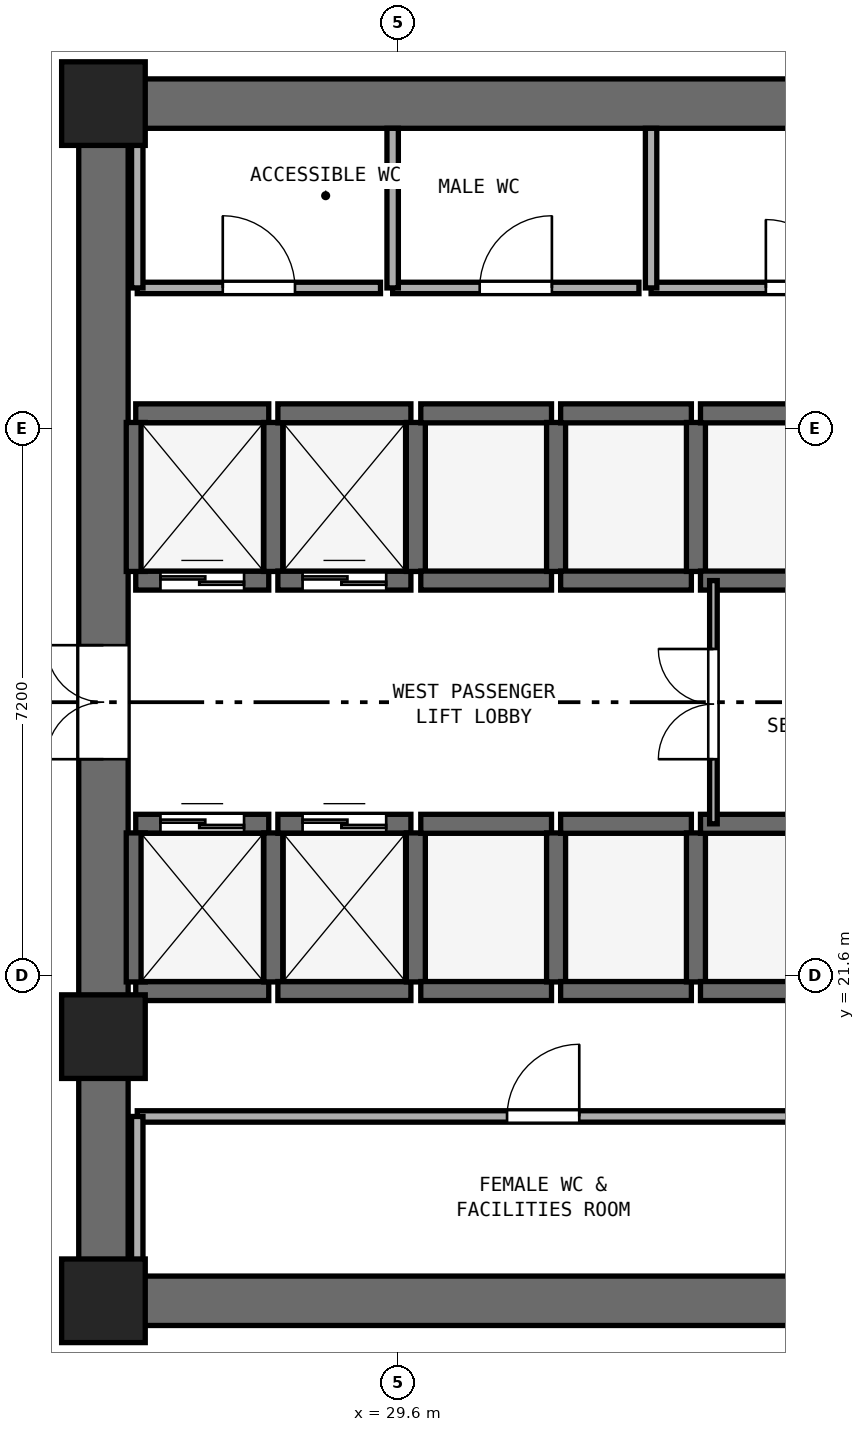
"""IFC4 building model, lengths in metres.
Left out: names, types, materials, properties, quantities, classifications, styles, units other than length and angle.
Written with IfcOpenShell. Run it as: python <this file> out.ifc"""

import sys

from ifc_helpers import new_model, si_unit, direction, frame, frame_2d, origin, origin_2d, place, context, subcontext, project, spatial, rectangle, extrude, element, fill, save


model = new_model("IFC4")
c1 = context("Model", 3, precision=1e-05, world=origin(), true_north=direction((0.0, 1.0)))
c2 = subcontext(c1, "Body", "Model", "MODEL_VIEW")
j1 = project(units=[si_unit("LENGTHUNIT", "METRE"), si_unit("PLANEANGLEUNIT", "RADIAN")], contexts=[c1])
p1 = place(None, origin())
s1 = spatial("IfcSite", under=j1, at=p1, CompositionType="ELEMENT")
p2 = place(p1, origin())
s2 = spatial("IfcBuilding", under=s1, at=p2, CompositionType="ELEMENT")
p3 = place(p2, frame((0.0, 0.0, 10.0)))
s3 = spatial("IfcBuildingStorey", under=s2, at=p3, CompositionType="ELEMENT", Elevation=10.0)
for number, where, z_axis, x_axis in (
    (1, (25.4, 17.325, 0.0), (0.0, 0.0, 1.0), (1.0, 0.0, 0.0)),
    (2, (25.4, 33.075, 0.0), (0.0, 0.0, 1.0), (1.0, 0.0, 0.0)),
):
    element("IfcWall", number, at=place(p3, frame(where, z_axis=z_axis, x_axis=x_axis)), inside=s3, PredefinedType="SHEAR", context=c2, shape_type="SweptSolid", body=[
        extrude(rectangle(XDim=23.2, YDim=0.65, at=frame_2d((11.6, 0.0))), origin(), (0.0, 0.0, 1.0), 4.68),
    ])
p4 = place(p3, frame((25.725, 17.65, 0.0), z_axis=(0.0, 0.0, 1.0), x_axis=(0.0, 1.0, 0.0)))
e3 = element("IfcWall", 3, at=p4, inside=s3, PredefinedType="SHEAR", context=c2, shape_type="SweptSolid", body=[
    extrude(rectangle(XDim=15.1, YDim=0.65, at=frame_2d((7.55, 0.0))), origin(), (0.0, 0.0, 1.0), 4.68),
])
p5 = place(p4, frame((6.8, 0.0, 0.0)))
e4 = element("IfcOpeningElement", 4, at=p5, cuts=e3, PredefinedType="OPENING", context=c2, shape_type="SweptSolid", body=[
    extrude(rectangle(XDim=1.5, YDim=2.15, at=frame_2d((0.75, 1.075))), frame((0.0, 0.335, 0.0), z_axis=(0.0, -1.0, 0.0), x_axis=(1.0, 0.0, 0.0)), (0.0, 0.0, 1.0), 0.67),
])
for number, where, z_axis, x_axis in (
    (5, (25.725, 17.325, 0.0), (0.0, 0.0, 1.0), (1.0, 0.0, 0.0)),
    (6, (25.725, 33.075, 0.0), (0.0, 0.0, 1.0), (1.0, 0.0, 0.0)),
    (7, (25.725, 20.8, 0.0), (0.0, 0.0, 1.0), (1.0, 0.0, 0.0)),
):
    element("IfcColumn", number, at=place(p3, frame(where, z_axis=z_axis, x_axis=x_axis)), inside=s3, PredefinedType="PILASTER", context=c2, shape_type="SweptSolid", body=[
        extrude(rectangle(XDim=1.1, YDim=1.1, at=origin_2d()), origin(), (0.0, 0.0, 1.0), 5.0),
    ])
p6 = place(p3, frame((26.15, 26.8, 0.0), z_axis=(0.0, 0.0, 1.0), x_axis=(1.0, 0.0, 0.0)))
e8 = element("IfcWall", 8, at=p6, inside=s3, PredefinedType="SHEAR", context=c2, shape_type="SweptSolid", body=[
    extrude(rectangle(XDim=1.75, YDim=0.25, at=frame_2d((0.875, 0.0))), origin(), (0.0, 0.0, 1.0), 4.68),
])
p7 = place(p6, frame((0.325, 0.0, 0.0)))
e9 = element("IfcOpeningElement", 9, at=p7, cuts=e8, PredefinedType="OPENING", context=c2, shape_type="SweptSolid", body=[
    extrude(rectangle(XDim=1.1, YDim=2.15, at=frame_2d((0.55, 1.075))), frame((0.0, 0.135, 0.0), z_axis=(0.0, -1.0, 0.0), x_axis=(1.0, 0.0, 0.0)), (0.0, 0.0, 1.0), 0.27),
])
p8 = place(p3, frame((26.15, 29.0, 0.0), z_axis=(0.0, 0.0, 1.0), x_axis=(1.0, 0.0, 0.0)))
e10 = element("IfcWall", 10, at=p8, inside=s3, PredefinedType="SHEAR", context=c2, shape_type="SweptSolid", body=[
    extrude(rectangle(XDim=1.75, YDim=0.25, at=frame_2d((0.875, 0.0))), origin(), (0.0, 0.0, 1.0), 4.68),
])
for number, where, z_axis, x_axis in (
    (11, (26.15, 26.92, 0.0), (0.0, 0.0, 1.0), (0.0, 1.0, 0.0)),
    (12, (27.96, 26.92, 0.0), (0.0, 0.0, 1.0), (0.0, 1.0, 0.0)),
):
    element("IfcWall", number, at=place(p3, frame(where, z_axis=z_axis, x_axis=x_axis)), inside=s3, PredefinedType="SHEAR", context=c2, shape_type="SweptSolid", body=[
        extrude(rectangle(XDim=1.96, YDim=0.25, at=frame_2d((0.98, 0.0))), origin(), (0.0, 0.0, 1.0), 4.68),
    ])
p9 = place(p3, frame((28.02, 26.8, 0.0), z_axis=(0.0, 0.0, 1.0), x_axis=(1.0, 0.0, 0.0)))
e13 = element("IfcWall", 13, at=p9, inside=s3, PredefinedType="SHEAR", context=c2, shape_type="SweptSolid", body=[
    extrude(rectangle(XDim=1.75, YDim=0.25, at=frame_2d((0.875, 0.0))), origin(), (0.0, 0.0, 1.0), 4.68),
])
p10 = place(p9, frame((0.325, 0.0, 0.0)))
e14 = element("IfcOpeningElement", 14, at=p10, cuts=e13, PredefinedType="OPENING", context=c2, shape_type="SweptSolid", body=[
    extrude(rectangle(XDim=1.1, YDim=2.15, at=frame_2d((0.55, 1.075))), frame((0.0, 0.135, 0.0), z_axis=(0.0, -1.0, 0.0), x_axis=(1.0, 0.0, 0.0)), (0.0, 0.0, 1.0), 0.27),
])
p11 = place(p3, frame((28.02, 29.0, 0.0), z_axis=(0.0, 0.0, 1.0), x_axis=(1.0, 0.0, 0.0)))
e15 = element("IfcWall", 15, at=p11, inside=s3, PredefinedType="SHEAR", context=c2, shape_type="SweptSolid", body=[
    extrude(rectangle(XDim=1.75, YDim=0.25, at=frame_2d((0.875, 0.0))), origin(), (0.0, 0.0, 1.0), 4.68),
])
p12 = place(p3, frame((29.835, 26.92, 0.0), z_axis=(0.0, 0.0, 1.0), x_axis=(0.0, 1.0, 0.0)))
e16 = element("IfcWall", 16, at=p12, inside=s3, PredefinedType="SHEAR", context=c2, shape_type="SweptSolid", body=[
    extrude(rectangle(XDim=1.96, YDim=0.25, at=frame_2d((0.98, 0.0))), origin(), (0.0, 0.0, 1.0), 4.68),
])
p13 = place(p3, frame((26.15, 21.4, 0.0), z_axis=(0.0, 0.0, 1.0), x_axis=(1.0, 0.0, 0.0)))
e17 = element("IfcWall", 17, at=p13, inside=s3, PredefinedType="SHEAR", context=c2, shape_type="SweptSolid", body=[
    extrude(rectangle(XDim=1.75, YDim=0.25, at=frame_2d((0.875, 0.0))), origin(), (0.0, 0.0, 1.0), 4.68),
])
p14 = place(p3, frame((26.15, 23.6, 0.0), z_axis=(0.0, 0.0, 1.0), x_axis=(1.0, 0.0, 0.0)))
e18 = element("IfcWall", 18, at=p14, inside=s3, PredefinedType="SHEAR", context=c2, shape_type="SweptSolid", body=[
    extrude(rectangle(XDim=1.75, YDim=0.25, at=frame_2d((0.875, 0.0))), origin(), (0.0, 0.0, 1.0), 4.68),
])
p15 = place(p14, frame((0.325, 0.0, 0.0)))
e19 = element("IfcOpeningElement", 19, at=p15, cuts=e18, PredefinedType="OPENING", context=c2, shape_type="SweptSolid", body=[
    extrude(rectangle(XDim=1.1, YDim=2.15, at=frame_2d((0.55, 1.075))), frame((0.0, 0.135, 0.0), z_axis=(0.0, -1.0, 0.0), x_axis=(1.0, 0.0, 0.0)), (0.0, 0.0, 1.0), 0.27),
])
for number, where, z_axis, x_axis in (
    (20, (26.15, 21.52, 0.0), (0.0, 0.0, 1.0), (0.0, 1.0, 0.0)),
    (21, (27.96, 21.52, 0.0), (0.0, 0.0, 1.0), (0.0, 1.0, 0.0)),
):
    element("IfcWall", number, at=place(p3, frame(where, z_axis=z_axis, x_axis=x_axis)), inside=s3, PredefinedType="SHEAR", context=c2, shape_type="SweptSolid", body=[
        extrude(rectangle(XDim=1.96, YDim=0.25, at=frame_2d((0.98, 0.0))), origin(), (0.0, 0.0, 1.0), 4.68),
    ])
p16 = place(p3, frame((28.02, 21.4, 0.0), z_axis=(0.0, 0.0, 1.0), x_axis=(1.0, 0.0, 0.0)))
e22 = element("IfcWall", 22, at=p16, inside=s3, PredefinedType="SHEAR", context=c2, shape_type="SweptSolid", body=[
    extrude(rectangle(XDim=1.75, YDim=0.25, at=frame_2d((0.875, 0.0))), origin(), (0.0, 0.0, 1.0), 4.68),
])
p17 = place(p3, frame((28.02, 23.6, 0.0), z_axis=(0.0, 0.0, 1.0), x_axis=(1.0, 0.0, 0.0)))
e23 = element("IfcWall", 23, at=p17, inside=s3, PredefinedType="SHEAR", context=c2, shape_type="SweptSolid", body=[
    extrude(rectangle(XDim=1.75, YDim=0.25, at=frame_2d((0.875, 0.0))), origin(), (0.0, 0.0, 1.0), 4.68),
])
p18 = place(p17, frame((0.325, 0.0, 0.0)))
e24 = element("IfcOpeningElement", 24, at=p18, cuts=e23, PredefinedType="OPENING", context=c2, shape_type="SweptSolid", body=[
    extrude(rectangle(XDim=1.1, YDim=2.15, at=frame_2d((0.55, 1.075))), frame((0.0, 0.135, 0.0), z_axis=(0.0, -1.0, 0.0), x_axis=(1.0, 0.0, 0.0)), (0.0, 0.0, 1.0), 0.27),
])
p19 = place(p3, frame((29.835, 21.52, 0.0), z_axis=(0.0, 0.0, 1.0), x_axis=(0.0, 1.0, 0.0)))
e25 = element("IfcWall", 25, at=p19, inside=s3, PredefinedType="SHEAR", context=c2, shape_type="SweptSolid", body=[
    extrude(rectangle(XDim=1.96, YDim=0.25, at=frame_2d((0.98, 0.0))), origin(), (0.0, 0.0, 1.0), 4.68),
])
for number, where, z_axis, x_axis in (
    (26, (29.9, 21.4, 0.0), (0.0, 0.0, 1.0), (1.0, 0.0, 0.0)),
    (27, (29.9, 23.6, 0.0), (0.0, 0.0, 1.0), (1.0, 0.0, 0.0)),
):
    element("IfcWall", number, at=place(p3, frame(where, z_axis=z_axis, x_axis=x_axis)), inside=s3, PredefinedType="SHEAR", context=c2, shape_type="SweptSolid", body=[
        extrude(rectangle(XDim=1.72, YDim=0.25, at=frame_2d((0.86, 0.0))), origin(), (0.0, 0.0, 1.0), 4.68),
    ])
p20 = place(p3, frame((31.68, 21.52, 0.0), z_axis=(0.0, 0.0, 1.0), x_axis=(0.0, 1.0, 0.0)))
e28 = element("IfcWall", 28, at=p20, inside=s3, PredefinedType="SHEAR", context=c2, shape_type="SweptSolid", body=[
    extrude(rectangle(XDim=1.96, YDim=0.25, at=frame_2d((0.98, 0.0))), origin(), (0.0, 0.0, 1.0), 4.68),
])
for number, where, z_axis, x_axis in (
    (29, (31.74, 21.4, 0.0), (0.0, 0.0, 1.0), (1.0, 0.0, 0.0)),
    (30, (31.74, 23.6, 0.0), (0.0, 0.0, 1.0), (1.0, 0.0, 0.0)),
):
    element("IfcWall", number, at=place(p3, frame(where, z_axis=z_axis, x_axis=x_axis)), inside=s3, PredefinedType="SHEAR", context=c2, shape_type="SweptSolid", body=[
        extrude(rectangle(XDim=1.72, YDim=0.25, at=frame_2d((0.86, 0.0))), origin(), (0.0, 0.0, 1.0), 4.68),
    ])
p21 = place(p3, frame((33.52, 21.52, 0.0), z_axis=(0.0, 0.0, 1.0), x_axis=(0.0, 1.0, 0.0)))
e31 = element("IfcWall", 31, at=p21, inside=s3, PredefinedType="SHEAR", context=c2, shape_type="SweptSolid", body=[
    extrude(rectangle(XDim=1.96, YDim=0.25, at=frame_2d((0.98, 0.0))), origin(), (0.0, 0.0, 1.0), 4.68),
])
for number, where, z_axis, x_axis in (
    (32, (33.58, 21.4, 0.0), (0.0, 0.0, 1.0), (1.0, 0.0, 0.0)),
    (33, (33.58, 23.6, 0.0), (0.0, 0.0, 1.0), (1.0, 0.0, 0.0)),
):
    element("IfcWall", number, at=place(p3, frame(where, z_axis=z_axis, x_axis=x_axis)), inside=s3, PredefinedType="SHEAR", context=c2, shape_type="SweptSolid", body=[
        extrude(rectangle(XDim=1.72, YDim=0.25, at=frame_2d((0.86, 0.0))), origin(), (0.0, 0.0, 1.0), 4.68),
    ])
for number, where, z_axis, x_axis in (
    (34, (29.9, 26.8, 0.0), (0.0, 0.0, 1.0), (1.0, 0.0, 0.0)),
    (35, (29.9, 29.0, 0.0), (0.0, 0.0, 1.0), (1.0, 0.0, 0.0)),
):
    element("IfcWall", number, at=place(p3, frame(where, z_axis=z_axis, x_axis=x_axis)), inside=s3, PredefinedType="SHEAR", context=c2, shape_type="SweptSolid", body=[
        extrude(rectangle(XDim=1.72, YDim=0.25, at=frame_2d((0.86, 0.0))), origin(), (0.0, 0.0, 1.0), 4.68),
    ])
p22 = place(p3, frame((31.68, 26.92, 0.0), z_axis=(0.0, 0.0, 1.0), x_axis=(0.0, 1.0, 0.0)))
e36 = element("IfcWall", 36, at=p22, inside=s3, PredefinedType="SHEAR", context=c2, shape_type="SweptSolid", body=[
    extrude(rectangle(XDim=1.96, YDim=0.25, at=frame_2d((0.98, 0.0))), origin(), (0.0, 0.0, 1.0), 4.68),
])
for number, where, z_axis, x_axis in (
    (37, (31.74, 26.8, 0.0), (0.0, 0.0, 1.0), (1.0, 0.0, 0.0)),
    (38, (31.74, 29.0, 0.0), (0.0, 0.0, 1.0), (1.0, 0.0, 0.0)),
):
    element("IfcWall", number, at=place(p3, frame(where, z_axis=z_axis, x_axis=x_axis)), inside=s3, PredefinedType="SHEAR", context=c2, shape_type="SweptSolid", body=[
        extrude(rectangle(XDim=1.72, YDim=0.25, at=frame_2d((0.86, 0.0))), origin(), (0.0, 0.0, 1.0), 4.68),
    ])
p23 = place(p3, frame((33.52, 26.92, 0.0), z_axis=(0.0, 0.0, 1.0), x_axis=(0.0, 1.0, 0.0)))
e39 = element("IfcWall", 39, at=p23, inside=s3, PredefinedType="SHEAR", context=c2, shape_type="SweptSolid", body=[
    extrude(rectangle(XDim=1.96, YDim=0.25, at=frame_2d((0.98, 0.0))), origin(), (0.0, 0.0, 1.0), 4.68),
])
for number, where, z_axis, x_axis in (
    (40, (33.58, 26.8, 0.0), (0.0, 0.0, 1.0), (1.0, 0.0, 0.0)),
    (41, (33.58, 29.0, 0.0), (0.0, 0.0, 1.0), (1.0, 0.0, 0.0)),
):
    element("IfcWall", number, at=place(p3, frame(where, z_axis=z_axis, x_axis=x_axis)), inside=s3, PredefinedType="SHEAR", context=c2, shape_type="SweptSolid", body=[
        extrude(rectangle(XDim=1.72, YDim=0.25, at=frame_2d((0.86, 0.0))), origin(), (0.0, 0.0, 1.0), 4.68),
    ])
p24 = place(p3, frame((26.17, 30.65, 0.0), z_axis=(0.0, 0.0, 1.0), x_axis=(1.0, 0.0, 0.0)))
e42 = element("IfcWall", 42, at=p24, inside=s3, PredefinedType="PARTITIONING", context=c2, shape_type="SweptSolid", body=[
    extrude(rectangle(XDim=3.2, YDim=0.15, at=frame_2d((1.6, 0.0))), origin(), (0.0, 0.0, 1.0), 4.68),
])
p25 = place(p24, frame((1.125, 0.0, 0.0)))
e43 = element("IfcOpeningElement", 43, at=p25, cuts=e42, PredefinedType="OPENING", context=c2, shape_type="SweptSolid", body=[
    extrude(rectangle(XDim=0.95, YDim=2.1, at=frame_2d((0.475, 1.05))), frame((0.0, 0.085, 0.0), z_axis=(0.0, -1.0, 0.0), x_axis=(1.0, 0.0, 0.0)), (0.0, 0.0, 1.0), 0.17),
])
p26 = place(p3, frame((26.17, 30.65, 0.0), z_axis=(0.0, 0.0, 1.0), x_axis=(0.0, 1.0, 0.0)))
e44 = element("IfcWall", 44, at=p26, inside=s3, PredefinedType="PARTITIONING", context=c2, shape_type="SweptSolid", body=[
    extrude(rectangle(XDim=2.1, YDim=0.15, at=frame_2d((1.05, 0.0))), origin(), (0.0, 0.0, 1.0), 4.68),
])
p27 = place(p3, frame((29.53, 30.65, 0.0), z_axis=(0.0, 0.0, 1.0), x_axis=(1.0, 0.0, 0.0)))
e45 = element("IfcWall", 45, at=p27, inside=s3, PredefinedType="PARTITIONING", context=c2, shape_type="SweptSolid", body=[
    extrude(rectangle(XDim=3.24, YDim=0.15, at=frame_2d((1.62, 0.0))), origin(), (0.0, 0.0, 1.0), 4.68),
])
p28 = place(p27, frame((1.145, 0.0, 0.0)))
e46 = element("IfcOpeningElement", 46, at=p28, cuts=e45, PredefinedType="OPENING", context=c2, shape_type="SweptSolid", body=[
    extrude(rectangle(XDim=0.95, YDim=2.1, at=frame_2d((0.475, 1.05))), frame((0.0, 0.085, 0.0), z_axis=(0.0, -1.0, 0.0), x_axis=(1.0, 0.0, 0.0)), (0.0, 0.0, 1.0), 0.17),
])
p29 = place(p3, frame((29.53, 30.65, 0.0), z_axis=(0.0, 0.0, 1.0), x_axis=(0.0, 1.0, 0.0)))
e47 = element("IfcWall", 47, at=p29, inside=s3, PredefinedType="PARTITIONING", context=c2, shape_type="SweptSolid", body=[
    extrude(rectangle(XDim=2.1, YDim=0.15, at=frame_2d((1.05, 0.0))), origin(), (0.0, 0.0, 1.0), 4.68),
])
p30 = place(p3, frame((32.93, 30.65, 0.0), z_axis=(0.0, 0.0, 1.0), x_axis=(1.0, 0.0, 0.0)))
e48 = element("IfcWall", 48, at=p30, inside=s3, PredefinedType="PARTITIONING", context=c2, shape_type="SweptSolid", body=[
    extrude(rectangle(XDim=3.92, YDim=0.15, at=frame_2d((1.96, 0.0))), origin(), (0.0, 0.0, 1.0), 4.68),
])
p31 = place(p30, frame((1.51, 0.0, 0.0)))
e49 = element("IfcOpeningElement", 49, at=p31, cuts=e48, PredefinedType="OPENING", context=c2, shape_type="SweptSolid", body=[
    extrude(rectangle(XDim=0.9, YDim=2.1, at=frame_2d((0.45, 1.05))), frame((0.0, 0.085, 0.0), z_axis=(0.0, -1.0, 0.0), x_axis=(1.0, 0.0, 0.0)), (0.0, 0.0, 1.0), 0.17),
])
p32 = place(p3, frame((32.93, 30.65, 0.0), z_axis=(0.0, 0.0, 1.0), x_axis=(0.0, 1.0, 0.0)))
e50 = element("IfcWall", 50, at=p32, inside=s3, PredefinedType="PARTITIONING", context=c2, shape_type="SweptSolid", body=[
    extrude(rectangle(XDim=2.1, YDim=0.15, at=frame_2d((1.05, 0.0))), origin(), (0.0, 0.0, 1.0), 4.68),
])
p33 = place(p3, frame((26.17, 19.75, 0.0), z_axis=(0.0, 0.0, 1.0), x_axis=(1.0, 0.0, 0.0)))
e51 = element("IfcWall", 51, at=p33, inside=s3, PredefinedType="PARTITIONING", context=c2, shape_type="SweptSolid", body=[
    extrude(rectangle(XDim=10.68, YDim=0.15, at=frame_2d((5.34, 0.0))), origin(), (0.0, 0.0, 1.0), 4.68),
])
p34 = place(p33, frame((4.865, 0.0, 0.0)))
e52 = element("IfcOpeningElement", 52, at=p34, cuts=e51, PredefinedType="OPENING", context=c2, shape_type="SweptSolid", body=[
    extrude(rectangle(XDim=0.95, YDim=2.1, at=frame_2d((0.475, 1.05))), frame((0.0, 0.085, 0.0), z_axis=(0.0, -1.0, 0.0), x_axis=(1.0, 0.0, 0.0)), (0.0, 0.0, 1.0), 0.17),
])
p35 = place(p3, frame((26.17, 17.65, 0.0), z_axis=(0.0, 0.0, 1.0), x_axis=(0.0, 1.0, 0.0)))
e53 = element("IfcWall", 53, at=p35, inside=s3, PredefinedType="PARTITIONING", context=c2, shape_type="SweptSolid", body=[
    extrude(rectangle(XDim=2.1, YDim=0.15, at=frame_2d((1.05, 0.0))), origin(), (0.0, 0.0, 1.0), 4.68),
])
p36 = place(p3, frame((33.75, 23.6, 0.0), z_axis=(0.0, 0.0, 1.0), x_axis=(0.0, 1.0, 0.0)))
e54 = element("IfcWall", 54, at=p36, inside=s3, PredefinedType="PARTITIONING", context=c2, shape_type="SweptSolid", body=[
    extrude(rectangle(XDim=3.2, YDim=0.1, at=frame_2d((1.6, 0.0))), origin(), (0.0, 0.0, 1.0), 4.68),
])
p37 = place(p36, frame((0.85, 0.0, 0.0)))
e55 = element("IfcOpeningElement", 55, at=p37, cuts=e54, PredefinedType="OPENING", context=c2, shape_type="SweptSolid", body=[
    extrude(rectangle(XDim=1.45, YDim=2.12, at=frame_2d((0.725, 1.06))), frame((0.0, 0.06, 0.0), z_axis=(0.0, -1.0, 0.0), x_axis=(1.0, 0.0, 0.0)), (0.0, 0.0, 1.0), 0.12),
])
p38 = place(p7, origin())
e56 = element("IfcDoor", 56, at=p38, inside=s3, OperationType="DOUBLE_DOOR_SLIDING", PredefinedType="DOOR", context=c2, shape_type="SweptSolid", body=[
    extrude(rectangle(XDim=1.1, YDim=2.15, at=frame_2d((0.55, 1.075))), frame((0.0, 0.025, 0.0), z_axis=(0.0, -1.0, 0.0), x_axis=(1.0, 0.0, 0.0)), (0.0, 0.0, 1.0), 0.05),
])
fill(e9, e56)
p39 = place(p10, origin())
e57 = element("IfcDoor", 57, at=p39, inside=s3, OperationType="DOUBLE_DOOR_SLIDING", PredefinedType="DOOR", context=c2, shape_type="SweptSolid", body=[
    extrude(rectangle(XDim=1.1, YDim=2.15, at=frame_2d((0.55, 1.075))), frame((0.0, 0.025, 0.0), z_axis=(0.0, -1.0, 0.0), x_axis=(1.0, 0.0, 0.0)), (0.0, 0.0, 1.0), 0.05),
])
fill(e14, e57)
p40 = place(p15, origin())
e58 = element("IfcDoor", 58, at=p40, inside=s3, OperationType="DOUBLE_DOOR_SLIDING", PredefinedType="DOOR", context=c2, shape_type="SweptSolid", body=[
    extrude(rectangle(XDim=1.1, YDim=2.15, at=frame_2d((0.55, 1.075))), frame((0.0, 0.025, 0.0), z_axis=(0.0, -1.0, 0.0), x_axis=(1.0, 0.0, 0.0)), (0.0, 0.0, 1.0), 0.05),
])
fill(e19, e58)
p41 = place(p18, origin())
e59 = element("IfcDoor", 59, at=p41, inside=s3, OperationType="DOUBLE_DOOR_SLIDING", PredefinedType="DOOR", context=c2, shape_type="SweptSolid", body=[
    extrude(rectangle(XDim=1.1, YDim=2.15, at=frame_2d((0.55, 1.075))), frame((0.0, 0.025, 0.0), z_axis=(0.0, -1.0, 0.0), x_axis=(1.0, 0.0, 0.0)), (0.0, 0.0, 1.0), 0.05),
])
fill(e24, e59)
p42 = place(p5, origin())
e60 = element("IfcDoor", 60, at=p42, inside=s3, OperationType="DOUBLE_DOOR_SINGLE_SWING", PredefinedType="DOOR", context=c2, shape_type="SweptSolid", body=[
    extrude(rectangle(XDim=1.5, YDim=2.15, at=frame_2d((0.75, 1.075))), frame((0.0, 0.025, 0.0), z_axis=(0.0, -1.0, 0.0), x_axis=(1.0, 0.0, 0.0)), (0.0, 0.0, 1.0), 0.05),
])
fill(e4, e60)
p43 = place(p25, origin())
e61 = element("IfcDoor", 61, at=p43, inside=s3, OperationType="SINGLE_SWING_LEFT", PredefinedType="DOOR", context=c2, shape_type="SweptSolid", body=[
    extrude(rectangle(XDim=0.95, YDim=2.1, at=frame_2d((0.475, 1.05))), frame((0.0, 0.025, 0.0), z_axis=(0.0, -1.0, 0.0), x_axis=(1.0, 0.0, 0.0)), (0.0, 0.0, 1.0), 0.05),
])
fill(e43, e61)
p44 = place(p28, origin())
e62 = element("IfcDoor", 62, at=p44, inside=s3, OperationType="SINGLE_SWING_RIGHT", PredefinedType="DOOR", context=c2, shape_type="SweptSolid", body=[
    extrude(rectangle(XDim=0.95, YDim=2.1, at=frame_2d((0.475, 1.05))), frame((0.0, 0.025, 0.0), z_axis=(0.0, -1.0, 0.0), x_axis=(1.0, 0.0, 0.0)), (0.0, 0.0, 1.0), 0.05),
])
fill(e46, e62)
p45 = place(p31, origin())
e63 = element("IfcDoor", 63, at=p45, inside=s3, OperationType="SINGLE_SWING_LEFT", PredefinedType="DOOR", context=c2, shape_type="SweptSolid", body=[
    extrude(rectangle(XDim=0.9, YDim=2.1, at=frame_2d((0.45, 1.05))), frame((0.0, 0.025, 0.0), z_axis=(0.0, -1.0, 0.0), x_axis=(1.0, 0.0, 0.0)), (0.0, 0.0, 1.0), 0.05),
])
fill(e49, e63)
p46 = place(p34, origin())
e64 = element("IfcDoor", 64, at=p46, inside=s3, OperationType="SINGLE_SWING_RIGHT", PredefinedType="DOOR", context=c2, shape_type="SweptSolid", body=[
    extrude(rectangle(XDim=0.95, YDim=2.1, at=frame_2d((0.475, 1.05))), frame((0.0, 0.025, 0.0), z_axis=(0.0, -1.0, 0.0), x_axis=(1.0, 0.0, 0.0)), (0.0, 0.0, 1.0), 0.05),
])
fill(e52, e64)
p47 = place(p37, origin())
e65 = element("IfcDoor", 65, at=p47, inside=s3, OperationType="DOUBLE_DOOR_SINGLE_SWING", PredefinedType="DOOR", context=c2, shape_type="SweptSolid", body=[
    extrude(rectangle(XDim=1.45, YDim=2.12, at=frame_2d((0.725, 1.06))), frame((0.0, 0.025, 0.0), z_axis=(0.0, -1.0, 0.0), x_axis=(1.0, 0.0, 0.0)), (0.0, 0.0, 1.0), 0.05),
])
fill(e55, e65)
save(model, sys.argv[1])
